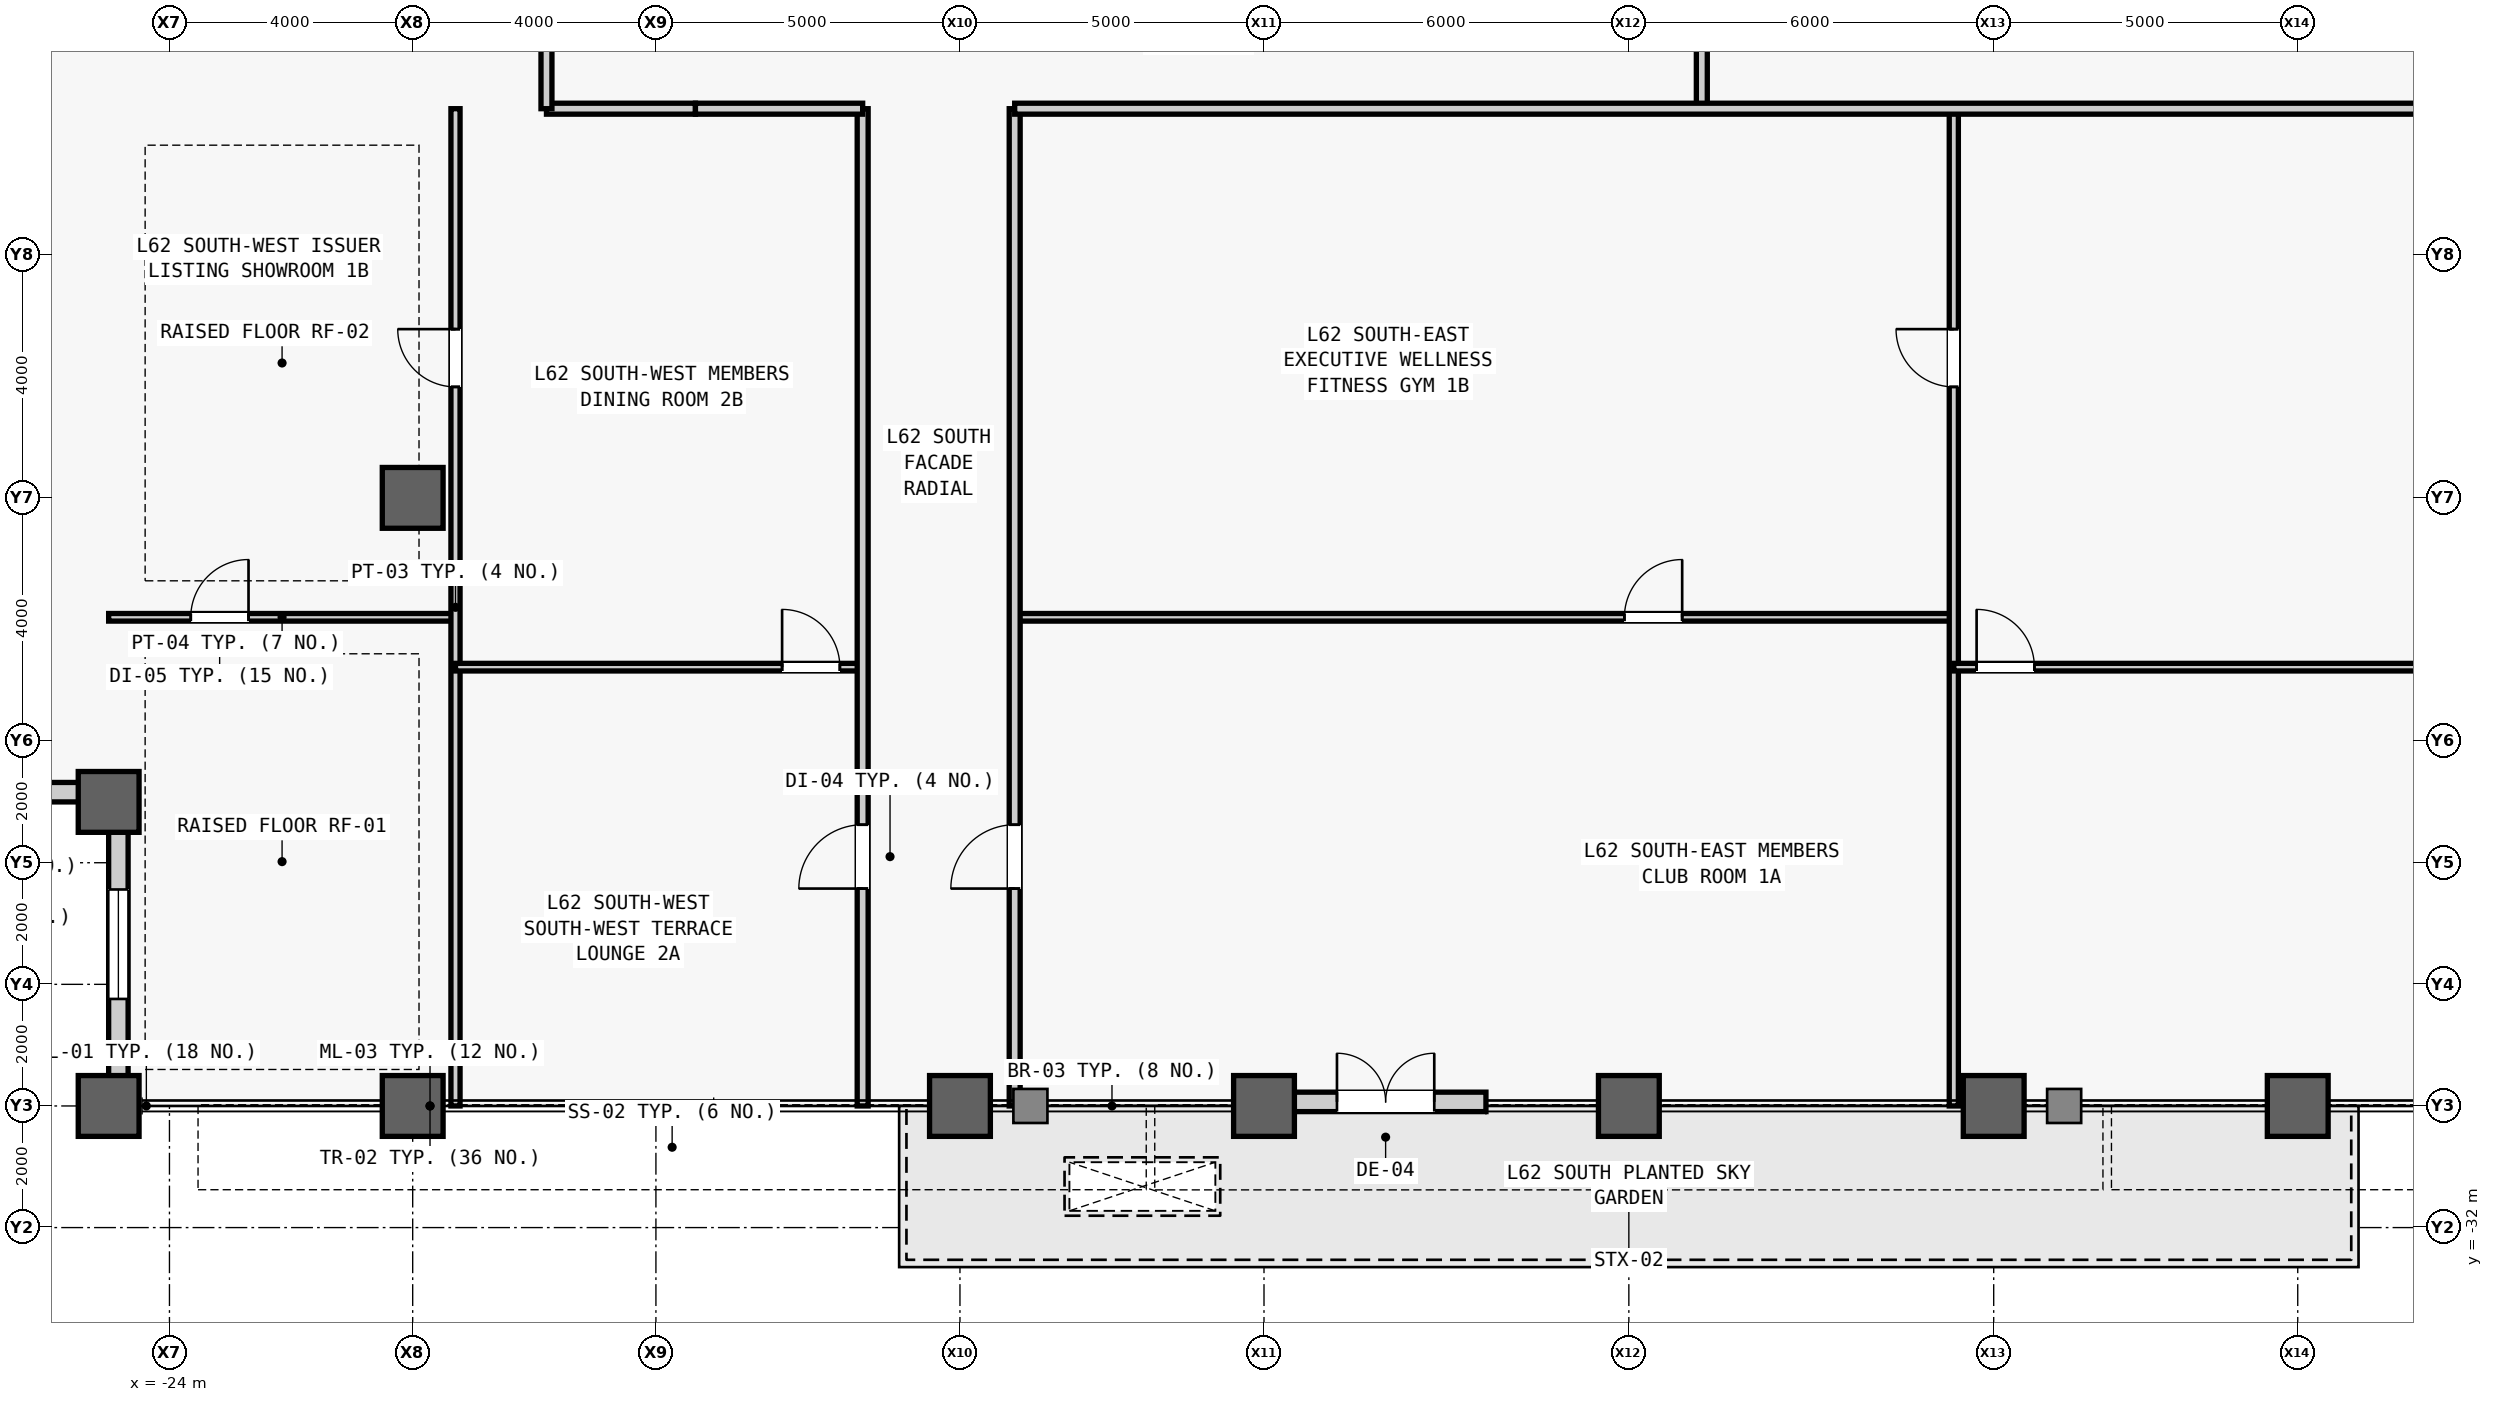
"""IFC4 building model, lengths in metres.
Left out: names, types, materials, properties, quantities, classifications, styles, units other than length and angle.
Written with IfcOpenShell. Run it as: python <this file> out.ifc"""

import sys

from ifc_helpers import new_model, si_unit, direction, frame, frame_2d, origin, origin_2d, place, context, subcontext, project, spatial, rectangle, hollow_rectangle, extrude, source, transform, mapped, element, fill, save


model = new_model("IFC4")
c1 = context("Model", 3, precision=1e-05, world=origin(), true_north=direction((0.0, 1.0)))
c2 = subcontext(c1, "Body", "Model", "MODEL_VIEW")
j1 = project(units=[si_unit("LENGTHUNIT", "METRE"), si_unit("PLANEANGLEUNIT", "RADIAN")], contexts=[c1])
p1 = place(None, origin())
s1 = spatial("IfcSite", under=j1, at=p1, CompositionType="ELEMENT")
p2 = place(p1, origin())
s2 = spatial("IfcBuilding", under=s1, at=p2, CompositionType="ELEMENT")
p3 = place(p2, frame((0.0, 0.0, 263.1)))
s3 = spatial("IfcBuildingStorey", under=s2, at=p3, CompositionType="ELEMENT", Elevation=263.1)
m1 = source(origin(), c2, "Body", "SweptSolid", [
    extrude(hollow_rectangle(XDim=1.0, YDim=1.0, WallThickness=0.055, at=origin_2d()), origin(), (0.0, 0.0, 1.0), 5.2),
])
for number, where, z_axis, x_axis in (
    (1, (-25.0, -30.0, 0.0), (0.0, 0.0, 1.0), (1.0, 0.0, 0.0)),
    (2, (-25.0, -25.0, 0.0), (0.0, 0.0, 1.0), (1.0, 0.0, 0.0)),
    (3, (-20.0, -30.0, 0.0), (0.0, 0.0, 1.0), (1.0, 0.0, 0.0)),
    (4, (-20.0, -20.0, 0.0), (0.0, 0.0, 1.0), (1.0, 0.0, 0.0)),
    (5, (-11.0, -30.0, 0.0), (0.0, 0.0, 1.0), (1.0, 0.0, 0.0)),
    (6, (-6.0, -30.0, 0.0), (0.0, 0.0, 1.0), (1.0, 0.0, 0.0)),
    (7, (0.0, -30.0, 0.0), (0.0, 0.0, 1.0), (1.0, 0.0, 0.0)),
    (8, (6.0, -30.0, 0.0), (0.0, 0.0, 1.0), (1.0, 0.0, 0.0)),
    (9, (11.0, -30.0, 0.0), (0.0, 0.0, 1.0), (1.0, 0.0, 0.0)),
):
    element("IfcColumn", number, at=place(p3, frame(where, z_axis=z_axis, x_axis=x_axis)), inside=s3, PredefinedType="COLUMN", context=c2, shape_type="MappedRepresentation", body=[
        mapped(m1, transform((0.0, 0.0, 0.0), scale=1.0)),
    ])
m2 = source(origin(), c2, "Body", "SweptSolid", [
    extrude(rectangle(XDim=4.68, YDim=0.32, at=frame_2d((2.34, 0.0))), origin(), (0.0, 0.0, 1.0), 3.984),
])
p4 = place(p3, frame((-25.0, -24.84, 0.0), z_axis=(0.0, 0.0, 1.0), x_axis=(-1.0, 0.0, 0.0)))
e10 = element("IfcWall", 10, at=p4, inside=s3, PredefinedType="STANDARD", context=c2, shape_type="MappedRepresentation", body=[
    mapped(m2, transform((0.0, 0.0, 0.0), scale=1.0)),
])
m3 = source(origin(), c2, "Body", "SweptSolid", [
    extrude(rectangle(XDim=1.8, YDim=2.4, at=frame_2d((0.9, 1.2))), frame((0.0, 0.17, 0.0), z_axis=(0.0, -1.0, 0.0), x_axis=(1.0, 0.0, 0.0)), (0.0, 0.0, 1.0), 0.34),
])
p5 = place(p4, frame((1.44, 0.0, 0.7)))
e11 = element("IfcOpeningElement", 11, at=p5, cuts=e10, PredefinedType="OPENING", context=c2, shape_type="MappedRepresentation", body=[
    mapped(m3, transform((0.0, 0.0, 0.0), scale=1.0)),
])
p6 = place(p3, frame((-24.84, -29.68, 0.0), z_axis=(0.0, 0.0, 1.0), x_axis=(0.0, 1.0, 0.0)))
e12 = element("IfcWall", 12, at=p6, inside=s3, PredefinedType="STANDARD", context=c2, shape_type="MappedRepresentation", body=[
    mapped(m2, transform((0.0, 0.0, 0.0), scale=1.0)),
])
p7 = place(p6, frame((1.44, 0.0, 0.7)))
e13 = element("IfcOpeningElement", 13, at=p7, cuts=e12, PredefinedType="OPENING", context=c2, shape_type="MappedRepresentation", body=[
    mapped(m3, transform((0.0, 0.0, 0.0), scale=1.0)),
])
m4 = source(origin(), c2, "Body", "SweptSolid", [
    extrude(rectangle(XDim=3.3, YDim=0.32, at=frame_2d((1.65, 0.0))), origin(), (0.0, 0.0, 1.0), 3.984),
])
p8 = place(p3, frame((-5.65, -29.933, 0.0), z_axis=(0.0, 0.0, 1.0), x_axis=(1.0, 0.0, 0.0)))
e14 = element("IfcWall", 14, at=p8, inside=s3, PredefinedType="STANDARD", context=c2, shape_type="MappedRepresentation", body=[
    mapped(m4, transform((0.0, 0.0, 0.0), scale=1.0)),
])
m5 = source(origin(), c2, "Body", "SweptSolid", [
    extrude(rectangle(XDim=1.6, YDim=2.25, at=frame_2d((0.8, 1.125))), frame((0.0, 0.17, 0.0), z_axis=(0.0, -1.0, 0.0), x_axis=(1.0, 0.0, 0.0)), (0.0, 0.0, 1.0), 0.34),
])
p9 = place(p8, frame((0.85, 0.0, 0.0)))
e15 = element("IfcOpeningElement", 15, at=p9, cuts=e14, PredefinedType="OPENING", context=c2, shape_type="MappedRepresentation", body=[
    mapped(m5, transform((0.0, 0.0, 0.0), scale=1.0)),
])
m6 = source(origin(), c2, "Body", "SweptSolid", [
    extrude(rectangle(XDim=2.45, YDim=0.18, at=frame_2d((1.225, 0.0))), origin(), (0.0, 0.0, 1.0), 4.6),
])
p10 = place(p3, frame((-17.8, -13.6, 0.0), z_axis=(0.0, 0.0, 1.0), x_axis=(1.0, 0.0, 0.0)))
e16 = element("IfcWall", 16, at=p10, inside=s3, PredefinedType="PARTITIONING", context=c2, shape_type="MappedRepresentation", body=[
    mapped(m6, transform((0.0, 0.0, 0.0), scale=1.0)),
])
m7 = source(origin(), c2, "Body", "SweptSolid", [
    extrude(rectangle(XDim=2.6, YDim=0.18, at=frame_2d((1.3, 0.0))), origin(), (0.0, 0.0, 1.0), 4.6),
])
p11 = place(p3, frame((1.2, -13.6, 0.0), z_axis=(0.0, 0.0, 1.0), x_axis=(0.0, 1.0, 0.0)))
e17 = element("IfcWall", 17, at=p11, inside=s3, PredefinedType="PARTITIONING", context=c2, shape_type="MappedRepresentation", body=[
    mapped(m7, transform((0.0, 0.0, 0.0), scale=1.0)),
])
m8 = source(origin(), c2, "Body", "SweptSolid", [
    extrude(rectangle(XDim=5.704, YDim=0.125, at=frame_2d((2.852, 0.0))), origin(), (0.0, 0.0, 1.0), 4.6),
])
p12 = place(p3, frame((-25.0, -21.964, 0.0), z_axis=(0.0, 0.0, 1.0), x_axis=(1.0, 0.0, 0.0)))
e18 = element("IfcWall", 18, at=p12, inside=s3, PredefinedType="PARTITIONING", context=c2, shape_type="MappedRepresentation", body=[
    mapped(m8, transform((0.0, 0.0, 0.0), scale=1.0)),
])
m9 = source(origin(), c2, "Body", "SweptSolid", [
    extrude(rectangle(XDim=0.95, YDim=2.15, at=frame_2d((0.475, 1.075))), frame((0.0, 0.073, 0.0), z_axis=(0.0, -1.0, 0.0), x_axis=(1.0, 0.0, 0.0)), (0.0, 0.0, 1.0), 0.145),
])
p13 = place(p12, frame((1.35, 0.0, 0.0)))
e19 = element("IfcOpeningElement", 19, at=p13, cuts=e18, PredefinedType="OPENING", context=c2, shape_type="MappedRepresentation", body=[
    mapped(m9, transform((0.0, 0.0, 0.0), scale=1.0)),
])
m10 = source(origin(), c2, "Body", "SweptSolid", [
    extrude(rectangle(XDim=16.4, YDim=0.15, at=frame_2d((8.2, 0.0))), origin(), (0.0, 0.0, 1.0), 4.6),
])
p14 = place(p3, frame((-19.296, -30.0, 0.0), z_axis=(0.0, 0.0, 1.0), x_axis=(0.0, 1.0, 0.0)))
e20 = element("IfcWall", 20, at=p14, inside=s3, PredefinedType="PARTITIONING", context=c2, shape_type="MappedRepresentation", body=[
    mapped(m10, transform((0.0, 0.0, 0.0), scale=1.0)),
])
m11 = source(origin(), c2, "Body", "SweptSolid", [
    extrude(rectangle(XDim=0.95, YDim=2.15, at=frame_2d((0.475, 1.075))), frame((0.0, 0.085, 0.0), z_axis=(0.0, -1.0, 0.0), x_axis=(1.0, 0.0, 0.0)), (0.0, 0.0, 1.0), 0.17),
])
p15 = place(p14, frame((11.825, 0.0, 0.0)))
e21 = element("IfcOpeningElement", 21, at=p15, cuts=e20, PredefinedType="OPENING", context=c2, shape_type="MappedRepresentation", body=[
    mapped(m11, transform((0.0, 0.0, 0.0), scale=1.0)),
])
m12 = source(origin(), c2, "Body", "SweptSolid", [
    extrude(rectangle(XDim=6.696, YDim=0.125, at=frame_2d((3.348, 0.0))), origin(), (0.0, 0.0, 1.0), 4.6),
])
p16 = place(p3, frame((-19.296, -22.784, 0.0), z_axis=(0.0, 0.0, 1.0), x_axis=(1.0, 0.0, 0.0)))
e22 = element("IfcWall", 22, at=p16, inside=s3, PredefinedType="PARTITIONING", context=c2, shape_type="MappedRepresentation", body=[
    mapped(m12, transform((0.0, 0.0, 0.0), scale=1.0)),
])
p17 = place(p16, frame((5.371, 0.0, 0.0)))
e23 = element("IfcOpeningElement", 23, at=p17, cuts=e22, PredefinedType="OPENING", context=c2, shape_type="MappedRepresentation", body=[
    mapped(m9, transform((0.0, 0.0, 0.0), scale=1.0)),
])
m13 = source(origin(), c2, "Body", "SweptSolid", [
    extrude(rectangle(XDim=16.4, YDim=0.18, at=frame_2d((8.2, 0.0))), origin(), (0.0, 0.0, 1.0), 4.6),
])
p18 = place(p3, frame((-12.6, -30.0, 0.0), z_axis=(0.0, 0.0, 1.0), x_axis=(0.0, 1.0, 0.0)))
e24 = element("IfcWall", 24, at=p18, inside=s3, PredefinedType="PARTITIONING", context=c2, shape_type="MappedRepresentation", body=[
    mapped(m13, transform((0.0, 0.0, 0.0), scale=1.0)),
])
m14 = source(origin(), c2, "Body", "SweptSolid", [
    extrude(rectangle(XDim=1.05, YDim=2.2, at=frame_2d((0.525, 1.1))), frame((0.0, 0.1, 0.0), z_axis=(0.0, -1.0, 0.0), x_axis=(1.0, 0.0, 0.0)), (0.0, 0.0, 1.0), 0.2),
])
p19 = place(p18, frame((3.575, 0.0, 0.0)))
e25 = element("IfcOpeningElement", 25, at=p19, cuts=e24, PredefinedType="OPENING", context=c2, shape_type="MappedRepresentation", body=[
    mapped(m14, transform((0.0, 0.0, 0.0), scale=1.0)),
])
m15 = source(origin(), c2, "Body", "SweptSolid", [
    extrude(rectangle(XDim=2.75, YDim=0.18, at=frame_2d((1.375, 0.0))), origin(), (0.0, 0.0, 1.0), 4.6),
])
p20 = place(p3, frame((-15.35, -13.6, 0.0), z_axis=(0.0, 0.0, 1.0), x_axis=(1.0, 0.0, 0.0)))
e26 = element("IfcWall", 26, at=p20, inside=s3, PredefinedType="PARTITIONING", context=c2, shape_type="MappedRepresentation", body=[
    mapped(m15, transform((0.0, 0.0, 0.0), scale=1.0)),
])
m16 = source(origin(), c2, "Body", "SweptSolid", [
    extrude(rectangle(XDim=15.444, YDim=0.125, at=frame_2d((7.722, 0.0))), origin(), (0.0, 0.0, 1.0), 4.6),
])
p21 = place(p3, frame((-10.1, -21.964, 0.0), z_axis=(0.0, 0.0, 1.0), x_axis=(1.0, 0.0, 0.0)))
e27 = element("IfcWall", 27, at=p21, inside=s3, PredefinedType="PARTITIONING", context=c2, shape_type="MappedRepresentation", body=[
    mapped(m16, transform((0.0, 0.0, 0.0), scale=1.0)),
])
p22 = place(p21, frame((10.027, 0.0, 0.0)))
e28 = element("IfcOpeningElement", 28, at=p22, cuts=e27, PredefinedType="OPENING", context=c2, shape_type="MappedRepresentation", body=[
    mapped(m9, transform((0.0, 0.0, 0.0), scale=1.0)),
])
p23 = place(p3, frame((5.344, -30.0, 0.0), z_axis=(0.0, 0.0, 1.0), x_axis=(0.0, 1.0, 0.0)))
e29 = element("IfcWall", 29, at=p23, inside=s3, PredefinedType="PARTITIONING", context=c2, shape_type="MappedRepresentation", body=[
    mapped(m10, transform((0.0, 0.0, 0.0), scale=1.0)),
])
p24 = place(p23, frame((11.825, 0.0, 0.0)))
e30 = element("IfcOpeningElement", 30, at=p24, cuts=e29, PredefinedType="OPENING", context=c2, shape_type="MappedRepresentation", body=[
    mapped(m11, transform((0.0, 0.0, 0.0), scale=1.0)),
])
m17 = source(origin(), c2, "Body", "SweptSolid", [
    extrude(rectangle(XDim=19.656, YDim=0.125, at=frame_2d((9.828, 0.0))), origin(), (0.0, 0.0, 1.0), 4.6),
])
p25 = place(p3, frame((5.344, -22.784, 0.0), z_axis=(0.0, 0.0, 1.0), x_axis=(1.0, 0.0, 0.0)))
e31 = element("IfcWall", 31, at=p25, inside=s3, PredefinedType="PARTITIONING", context=c2, shape_type="MappedRepresentation", body=[
    mapped(m17, transform((0.0, 0.0, 0.0), scale=1.0)),
])
p26 = place(p25, frame((0.375, 0.0, 0.0)))
e32 = element("IfcOpeningElement", 32, at=p26, cuts=e31, PredefinedType="OPENING", context=c2, shape_type="MappedRepresentation", body=[
    mapped(m9, transform((0.0, 0.0, 0.0), scale=1.0)),
])
p27 = place(p3, frame((-10.1, -30.0, 0.0), z_axis=(0.0, 0.0, 1.0), x_axis=(0.0, 1.0, 0.0)))
e33 = element("IfcWall", 33, at=p27, inside=s3, PredefinedType="PARTITIONING", context=c2, shape_type="MappedRepresentation", body=[
    mapped(m13, transform((0.0, 0.0, 0.0), scale=1.0)),
])
p28 = place(p27, frame((3.575, 0.0, 0.0)))
e34 = element("IfcOpeningElement", 34, at=p28, cuts=e33, PredefinedType="OPENING", context=c2, shape_type="MappedRepresentation", body=[
    mapped(m14, transform((0.0, 0.0, 0.0), scale=1.0)),
])
m18 = source(origin(), c2, "Body", "SweptSolid", [
    extrude(rectangle(XDim=25.45, YDim=0.18, at=frame_2d((12.725, 0.0))), origin(), (0.0, 0.0, 1.0), 4.6),
])
p29 = place(p3, frame((-10.1, -13.6, 0.0), z_axis=(0.0, 0.0, 1.0), x_axis=(1.0, 0.0, 0.0)))
e35 = element("IfcWall", 35, at=p29, inside=s3, PredefinedType="PARTITIONING", context=c2, shape_type="MappedRepresentation", body=[
    mapped(m18, transform((0.0, 0.0, 0.0), scale=1.0)),
])
m19 = source(origin(), c2, "Body", "SweptSolid", [
    extrude(rectangle(XDim=17.9, YDim=0.18, at=frame_2d((8.95, 0.0))), origin(), (0.0, 0.0, 1.0), 4.6),
])
p30 = place(p3, frame((-17.8, -13.6, 0.0), z_axis=(0.0, 0.0, 1.0), x_axis=(0.0, 1.0, 0.0)))
e36 = element("IfcWall", 36, at=p30, inside=s3, PredefinedType="PARTITIONING", context=c2, shape_type="MappedRepresentation", body=[
    mapped(m19, transform((0.0, 0.0, 0.0), scale=1.0)),
])
m20 = source(origin(), c2, "Body", "SweptSolid", [
    extrude(rectangle(XDim=1.8, YDim=2.4, at=frame_2d((0.9, 1.2))), frame((0.0, 0.03, 0.0), z_axis=(0.0, -1.0, 0.0), x_axis=(1.0, 0.0, 0.0)), (0.0, 0.0, 1.0), 0.06),
])
p31 = place(p7, origin())
e37 = element("IfcWindow", 37, at=p31, inside=s3, PartitioningType="SINGLE_PANEL", PredefinedType="WINDOW", context=c2, shape_type="MappedRepresentation", body=[
    mapped(m20, transform((0.0, 0.0, 0.0), scale=1.0)),
])
fill(e13, e37)
m21 = source(origin(), c2, "Body", "SweptSolid", [
    extrude(rectangle(XDim=1.6, YDim=2.25, at=frame_2d((0.8, 1.125))), frame((0.0, 0.025, 0.0), z_axis=(0.0, -1.0, 0.0), x_axis=(1.0, 0.0, 0.0)), (0.0, 0.0, 1.0), 0.05),
])
p32 = place(p9, origin())
e38 = element("IfcDoor", 38, at=p32, inside=s3, OperationType="DOUBLE_DOOR_SINGLE_SWING", PredefinedType="DOOR", context=c2, shape_type="MappedRepresentation", body=[
    mapped(m21, transform((0.0, 0.0, 0.0), scale=1.0)),
])
fill(e15, e38)
m22 = source(origin(), c2, "Body", "SweptSolid", [
    extrude(rectangle(XDim=0.95, YDim=2.15, at=frame_2d((0.475, 1.075))), frame((0.0, 0.025, 0.0), z_axis=(0.0, -1.0, 0.0), x_axis=(1.0, 0.0, 0.0)), (0.0, 0.0, 1.0), 0.05),
])
p33 = place(p13, origin())
e39 = element("IfcDoor", 39, at=p33, inside=s3, OperationType="SINGLE_SWING_RIGHT", PredefinedType="DOOR", context=c2, shape_type="MappedRepresentation", body=[
    mapped(m22, transform((0.0, 0.0, 0.0), scale=1.0)),
])
fill(e19, e39)
p34 = place(p15, origin())
e40 = element("IfcDoor", 40, at=p34, inside=s3, OperationType="SINGLE_SWING_RIGHT", PredefinedType="DOOR", context=c2, shape_type="MappedRepresentation", body=[
    mapped(m22, transform((0.0, 0.0, 0.0), scale=1.0)),
])
fill(e21, e40)
p35 = place(p17, origin())
e41 = element("IfcDoor", 41, at=p35, inside=s3, OperationType="SINGLE_SWING_LEFT", PredefinedType="DOOR", context=c2, shape_type="MappedRepresentation", body=[
    mapped(m22, transform((0.0, 0.0, 0.0), scale=1.0)),
])
fill(e23, e41)
m23 = source(origin(), c2, "Body", "SweptSolid", [
    extrude(rectangle(XDim=1.05, YDim=2.2, at=frame_2d((0.525, 1.1))), frame((0.0, 0.025, 0.0), z_axis=(0.0, -1.0, 0.0), x_axis=(1.0, 0.0, 0.0)), (0.0, 0.0, 1.0), 0.05),
])
p36 = place(p19, origin())
e42 = element("IfcDoor", 42, at=p36, inside=s3, OperationType="SINGLE_SWING_LEFT", PredefinedType="DOOR", context=c2, shape_type="MappedRepresentation", body=[
    mapped(m23, transform((0.0, 0.0, 0.0), scale=1.0)),
])
fill(e25, e42)
p37 = place(p22, origin())
e43 = element("IfcDoor", 43, at=p37, inside=s3, OperationType="SINGLE_SWING_RIGHT", PredefinedType="DOOR", context=c2, shape_type="MappedRepresentation", body=[
    mapped(m22, transform((0.0, 0.0, 0.0), scale=1.0)),
])
fill(e28, e43)
p38 = place(p24, origin())
e44 = element("IfcDoor", 44, at=p38, inside=s3, OperationType="SINGLE_SWING_RIGHT", PredefinedType="DOOR", context=c2, shape_type="MappedRepresentation", body=[
    mapped(m22, transform((0.0, 0.0, 0.0), scale=1.0)),
])
fill(e30, e44)
p39 = place(p26, origin())
e45 = element("IfcDoor", 45, at=p39, inside=s3, OperationType="SINGLE_SWING_LEFT", PredefinedType="DOOR", context=c2, shape_type="MappedRepresentation", body=[
    mapped(m22, transform((0.0, 0.0, 0.0), scale=1.0)),
])
fill(e32, e45)
p40 = place(p28, origin())
e46 = element("IfcDoor", 46, at=p40, inside=s3, OperationType="SINGLE_SWING_LEFT", PredefinedType="DOOR", context=c2, shape_type="MappedRepresentation", body=[
    mapped(m23, transform((0.0, 0.0, 0.0), scale=1.0)),
])
fill(e34, e46)
save(model, sys.argv[1])
